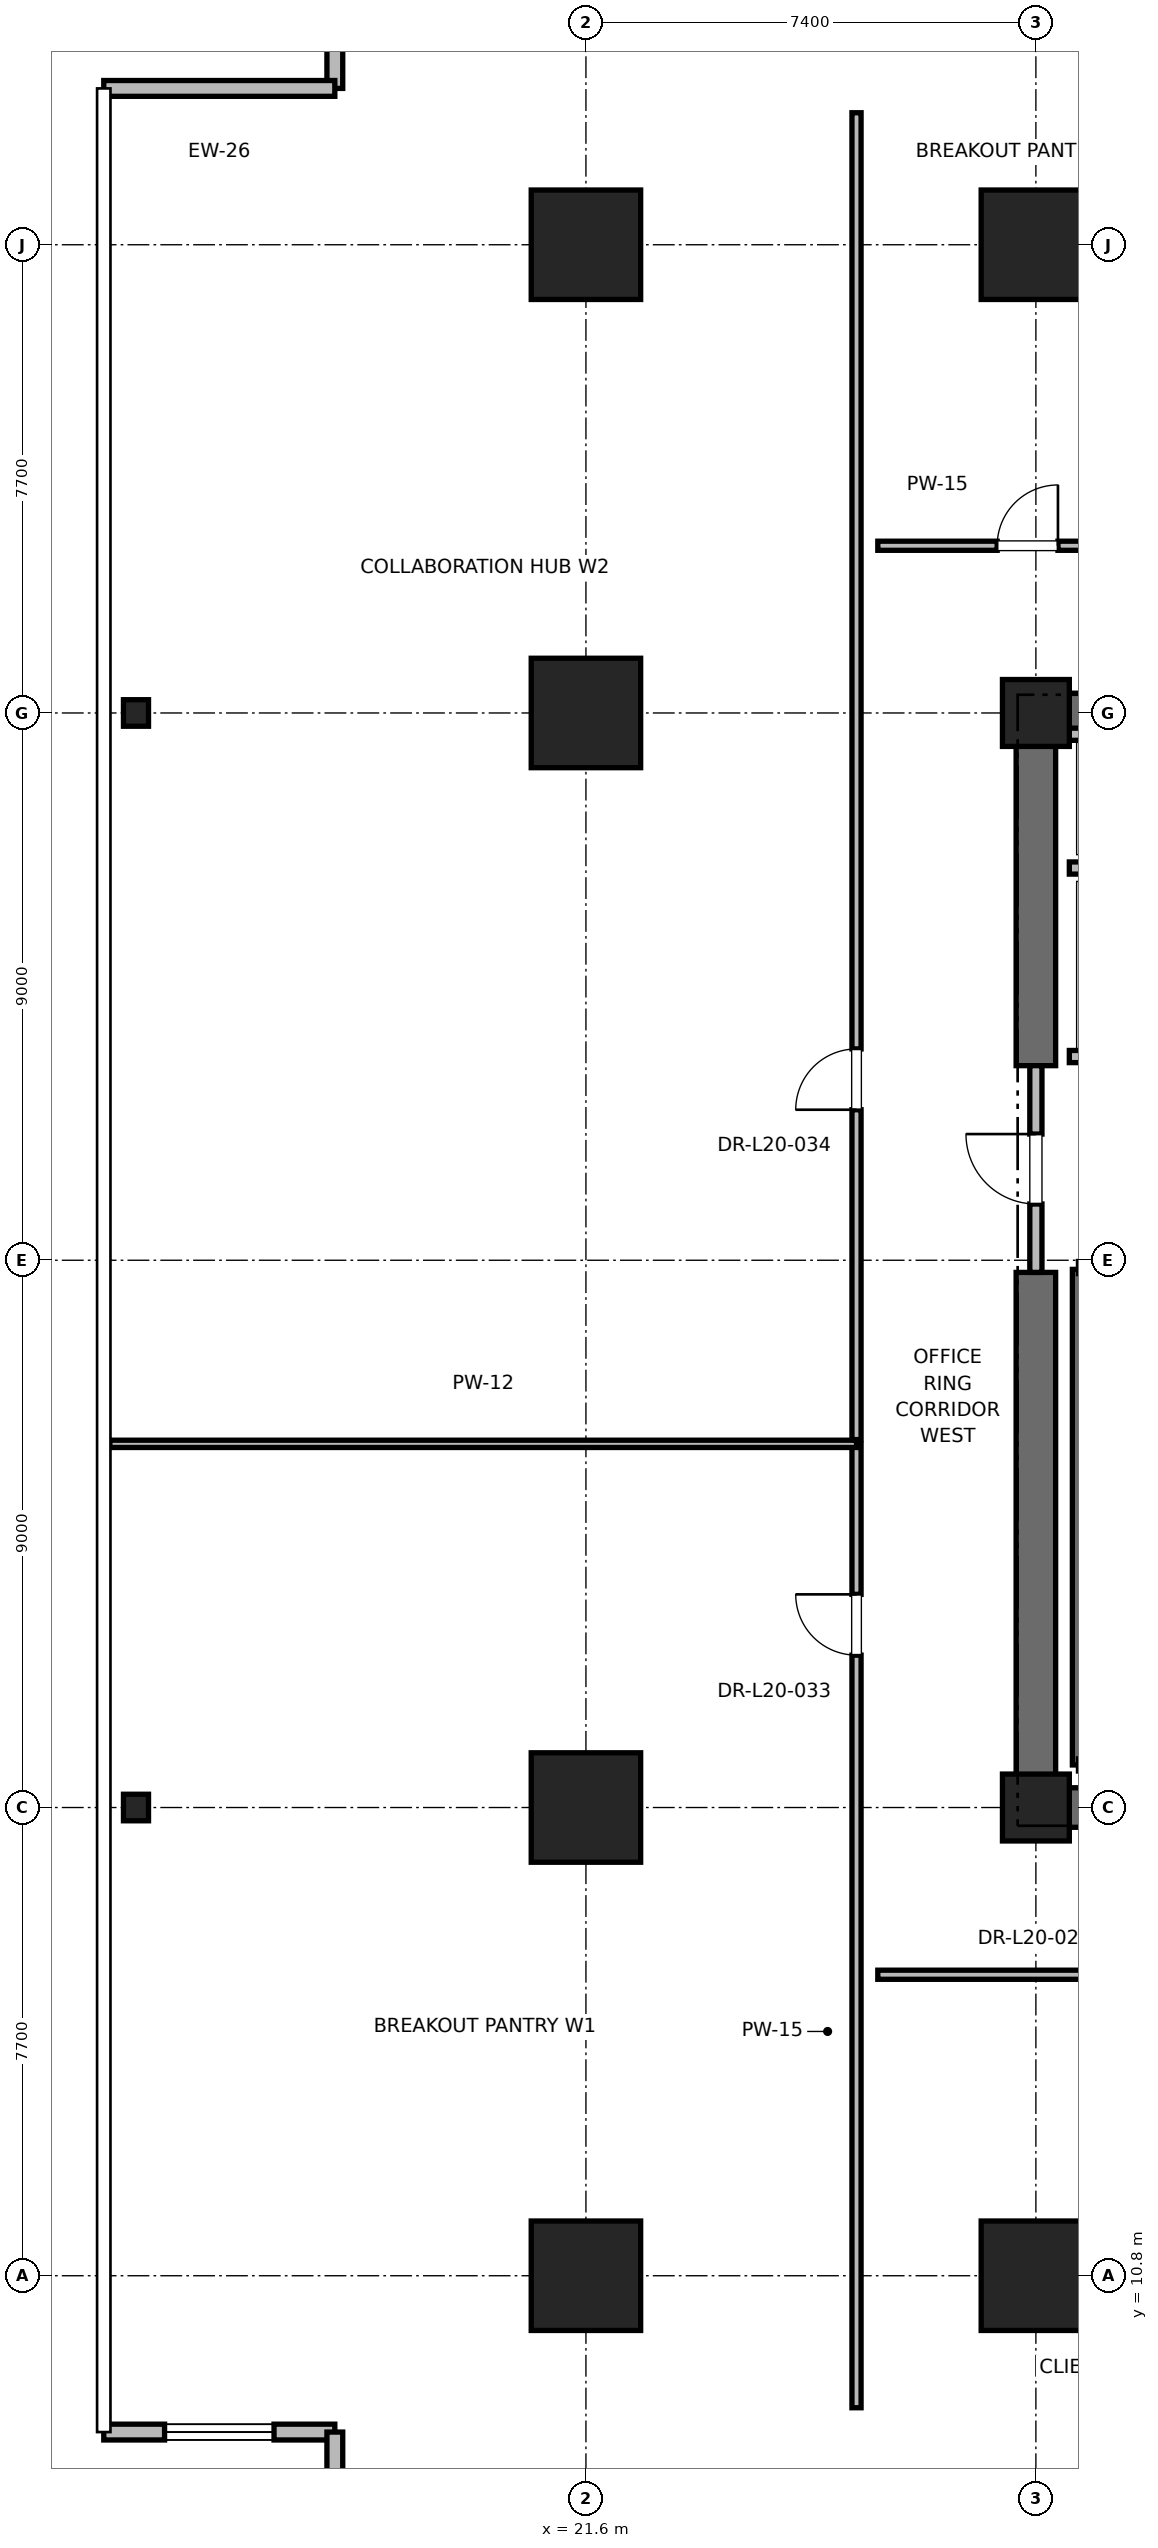
"""IFC4 building model, lengths in metres.
Left out: names, types, materials, properties, quantities, classifications, styles, units other than length and angle.
Written with IfcOpenShell. Run it as: python <this file> out.ifc"""

import sys

from ifc_helpers import new_model, si_unit, direction, frame, frame_2d, origin, origin_2d, place, context, subcontext, project, spatial, rectangle, i_section, extrude, element, fill, save


model = new_model("IFC4")
c1 = context("Model", 3, precision=1e-05, world=origin(), true_north=direction((0.0, 1.0)))
c2 = subcontext(c1, "Body", "Model", "MODEL_VIEW")
j1 = project(units=[si_unit("LENGTHUNIT", "METRE"), si_unit("PLANEANGLEUNIT", "RADIAN")], contexts=[c1])
p1 = place(None, origin())
s1 = spatial("IfcSite", under=j1, at=p1, CompositionType="ELEMENT")
p2 = place(p1, origin())
s2 = spatial("IfcBuilding", under=s1, at=p2, CompositionType="ELEMENT")
p3 = place(p2, frame((0.0, 0.0, 87.6)))
s3 = spatial("IfcBuildingStorey", under=s2, at=p3, CompositionType="ELEMENT", Elevation=87.6)
for number, where, z_axis, x_axis in (
    (1, (29.0, 10.8, 0.0), (0.0, 0.0, 1.0), (1.0, 0.0, 0.0)),
    (2, (29.0, 44.2, 0.0), (0.0, 0.0, 1.0), (1.0, 0.0, 0.0)),
    (3, (21.6, 18.5, 0.0), (0.0, 0.0, 1.0), (1.0, 0.0, 0.0)),
    (4, (21.6, 36.5, 0.0), (0.0, 0.0, 1.0), (1.0, 0.0, 0.0)),
    (5, (21.6, 10.8, 0.0), (0.0, 0.0, 1.0), (1.0, 0.0, 0.0)),
    (6, (21.6, 44.2, 0.0), (0.0, 0.0, 1.0), (1.0, 0.0, 0.0)),
):
    element("IfcColumn", number, at=place(p3, frame(where, z_axis=z_axis, x_axis=x_axis)), inside=s3, PredefinedType="COLUMN", context=c2, shape_type="SweptSolid", body=[
        extrude(rectangle(XDim=1.8, YDim=1.8, at=origin_2d()), origin(), (0.0, 0.0, 1.0), 4.0),
    ])
for number, where, z_axis, x_axis in (
    (7, (14.2, 18.5, 0.0), (0.0, 0.0, 1.0), (1.0, 0.0, 0.0)),
    (8, (14.2, 36.5, 0.0), (0.0, 0.0, 1.0), (1.0, 0.0, 0.0)),
):
    element("IfcColumn", number, at=place(p3, frame(where, z_axis=z_axis, x_axis=x_axis)), inside=s3, PredefinedType="COLUMN", context=c2, shape_type="SweptSolid", body=[
        extrude(i_section(OverallWidth=0.412, OverallDepth=0.437, WebThickness=0.036, FlangeThickness=0.058, FilletRadius=0.015, at=origin_2d()), origin(), (0.0, 0.0, 1.0), 4.0),
    ])
for number, where, z_axis, x_axis in (
    (9, (29.0, 18.5, 0.0), (0.0, 0.0, 1.0), (1.0, 0.0, 0.0)),
    (10, (29.0, 36.5, 0.0), (0.0, 0.0, 1.0), (1.0, 0.0, 0.0)),
):
    element("IfcColumn", number, at=place(p3, frame(where, z_axis=z_axis, x_axis=x_axis)), inside=s3, PredefinedType="PILASTER", context=c2, shape_type="SweptSolid", body=[
        extrude(rectangle(XDim=1.1, YDim=1.1, at=origin_2d()), origin(), (0.0, 0.0, 1.0), 4.0),
    ])
p4 = place(p3, frame((29.0, 18.5, 0.0), z_axis=(0.0, 0.0, 1.0), x_axis=(1.0, 0.0, 0.0)))
e11 = element("IfcWall", 11, at=p4, inside=s3, PredefinedType="SHEAR", context=c2, shape_type="SweptSolid", body=[
    extrude(rectangle(XDim=9.2, YDim=0.65, at=frame_2d((4.6, 0.0))), origin(), (0.0, 0.0, 1.0), 3.76),
])
p5 = place(p3, frame((29.0, 36.5, 0.0), z_axis=(0.0, 0.0, 1.0), x_axis=(1.0, 0.0, 0.0)))
e12 = element("IfcWall", 12, at=p5, inside=s3, PredefinedType="SHEAR", context=c2, shape_type="SweptSolid", body=[
    extrude(rectangle(XDim=5.8, YDim=0.65, at=frame_2d((2.9, 0.0))), origin(), (0.0, 0.0, 1.0), 3.76),
])
p6 = place(p3, frame((29.0, 18.5, 0.0), z_axis=(0.0, 0.0, 1.0), x_axis=(0.0, 1.0, 0.0)))
e13 = element("IfcWall", 13, at=p6, inside=s3, PredefinedType="SHEAR", context=c2, shape_type="SweptSolid", body=[
    extrude(rectangle(XDim=8.8, YDim=0.65, at=frame_2d((4.4, 0.0))), origin(), (0.0, 0.0, 1.0), 3.76),
])
p7 = place(p3, frame((29.0, 30.7, 0.0), z_axis=(0.0, 0.0, 1.0), x_axis=(0.0, 1.0, 0.0)))
e14 = element("IfcWall", 14, at=p7, inside=s3, PredefinedType="SHEAR", context=c2, shape_type="SweptSolid", body=[
    extrude(rectangle(XDim=5.8, YDim=0.65, at=frame_2d((2.9, 0.0))), origin(), (0.0, 0.0, 1.0), 3.76),
])
p8 = place(p3, frame((13.67, 8.229, 0.0), z_axis=(0.0, 0.0, 1.0), x_axis=(1.0, 0.0, 0.0)))
e15 = element("IfcWall", 15, at=p8, inside=s3, PredefinedType="PARAPET", context=c2, shape_type="SweptSolid", body=[
    extrude(rectangle(XDim=3.8, YDim=0.26, at=frame_2d((1.9, 0.0))), origin(), (0.0, 0.0, 1.0), 3.76),
])
p9 = place(p8, frame((1.0, 0.0, 0.85)))
e16 = element("IfcOpeningElement", 16, at=p9, cuts=e15, PredefinedType="OPENING", context=c2, shape_type="SweptSolid", body=[
    extrude(rectangle(XDim=1.8, YDim=2.2, at=frame_2d((0.9, 1.1))), frame((0.0, 0.13, 0.0), z_axis=(0.0, -1.0, 0.0), x_axis=(1.0, 0.0, 0.0)), (0.0, 0.0, 1.0), 0.26),
])
p10 = place(p3, frame((17.47, 8.229, 0.0), z_axis=(0.0, 0.0, 1.0), x_axis=(0.0, -1.0, 0.0)))
e17 = element("IfcWall", 17, at=p10, inside=s3, PredefinedType="PARAPET", context=c2, shape_type="SweptSolid", body=[
    extrude(rectangle(XDim=3.4, YDim=0.26, at=frame_2d((1.7, 0.0))), origin(), (0.0, 0.0, 1.0), 3.76),
])
p11 = place(p3, frame((17.47, 50.171, 0.0), z_axis=(0.0, 0.0, 1.0), x_axis=(0.0, -1.0, 0.0)))
e18 = element("IfcWall", 18, at=p11, inside=s3, PredefinedType="PARAPET", context=c2, shape_type="SweptSolid", body=[
    extrude(rectangle(XDim=3.4, YDim=0.26, at=frame_2d((1.7, 0.0))), origin(), (0.0, 0.0, 1.0), 3.76),
])
p12 = place(p11, frame((0.8, 0.0, 0.85)))
e19 = element("IfcOpeningElement", 19, at=p12, cuts=e18, PredefinedType="OPENING", context=c2, shape_type="SweptSolid", body=[
    extrude(rectangle(XDim=1.8, YDim=2.2, at=frame_2d((0.9, 1.1))), frame((0.0, 0.13, 0.0), z_axis=(0.0, -1.0, 0.0), x_axis=(1.0, 0.0, 0.0)), (0.0, 0.0, 1.0), 0.26),
])
p13 = place(p3, frame((17.47, 46.771, 0.0), z_axis=(0.0, 0.0, 1.0), x_axis=(-1.0, 0.0, 0.0)))
e20 = element("IfcWall", 20, at=p13, inside=s3, PredefinedType="PARAPET", context=c2, shape_type="SweptSolid", body=[
    extrude(rectangle(XDim=3.8, YDim=0.26, at=frame_2d((1.9, 0.0))), origin(), (0.0, 0.0, 1.0), 3.76),
])
p14 = place(p3, frame((29.7, 19.2, 0.0), z_axis=(0.0, 0.0, 1.0), x_axis=(0.0, 1.0, 0.0)))
e21 = element("IfcWall", 21, at=p14, inside=s3, PredefinedType="SOLIDWALL", context=c2, shape_type="SweptSolid", body=[
    extrude(rectangle(XDim=8.15, YDim=0.2, at=frame_2d((4.075, 0.0))), origin(), (0.0, 0.0, 1.0), 3.76),
])
p15 = place(p3, frame((29.0, 27.3, 0.0), z_axis=(0.0, 0.0, 1.0), x_axis=(0.0, 1.0, 0.0)))
e22 = element("IfcWall", 22, at=p15, inside=s3, PredefinedType="PARTITIONING", context=c2, shape_type="SweptSolid", body=[
    extrude(rectangle(XDim=3.4, YDim=0.2, at=frame_2d((1.7, 0.0))), origin(), (0.0, 0.0, 1.0), 2.54),
])
p16 = place(p15, frame((1.125, 0.0, 0.0)))
e23 = element("IfcOpeningElement", 23, at=p16, cuts=e22, PredefinedType="OPENING", context=c2, shape_type="SweptSolid", body=[
    extrude(rectangle(XDim=1.15, YDim=2.2, at=frame_2d((0.575, 1.1))), frame((0.0, 0.1, 0.0), z_axis=(0.0, -1.0, 0.0), x_axis=(1.0, 0.0, 0.0)), (0.0, 0.0, 1.0), 0.2),
])
p17 = place(p3, frame((29.55, 30.85, 0.0), z_axis=(0.0, 0.0, 1.0), x_axis=(1.0, 0.0, 0.0)))
e24 = element("IfcWall", 24, at=p17, inside=s3, PredefinedType="SOLIDWALL", context=c2, shape_type="SweptSolid", body=[
    extrude(rectangle(XDim=2.6, YDim=0.2, at=frame_2d((1.3, 0.0))), origin(), (0.0, 0.0, 1.0), 2.54),
])
p18 = place(p17, frame((0.75, 0.0, 0.0)))
e25 = element("IfcOpeningElement", 25, at=p18, cuts=e24, PredefinedType="OPENING", context=c2, shape_type="SweptSolid", body=[
    extrude(rectangle(XDim=1.1, YDim=2.2, at=frame_2d((0.55, 1.1))), frame((0.0, 0.1, 0.0), z_axis=(0.0, -1.0, 0.0), x_axis=(1.0, 0.0, 0.0)), (0.0, 0.0, 1.0), 0.2),
])
p19 = place(p3, frame((29.55, 33.95, 0.0), z_axis=(0.0, 0.0, 1.0), x_axis=(1.0, 0.0, 0.0)))
e26 = element("IfcWall", 26, at=p19, inside=s3, PredefinedType="SOLIDWALL", context=c2, shape_type="SweptSolid", body=[
    extrude(rectangle(XDim=2.8, YDim=0.2, at=frame_2d((1.4, 0.0))), origin(), (0.0, 0.0, 1.0), 3.76),
])
p20 = place(p3, frame((32.35, 36.15, 0.0), z_axis=(0.0, 0.0, 1.0), x_axis=(-1.0, 0.0, 0.0)))
e27 = element("IfcWall", 27, at=p20, inside=s3, PredefinedType="SOLIDWALL", context=c2, shape_type="SweptSolid", body=[
    extrude(rectangle(XDim=2.8, YDim=0.2, at=frame_2d((1.4, 0.0))), origin(), (0.0, 0.0, 1.0), 2.889),
])
p21 = place(p3, frame((26.4, 39.25, 0.0), z_axis=(0.0, 0.0, 1.0), x_axis=(1.0, 0.0, 0.0)))
e28 = element("IfcWall", 28, at=p21, inside=s3, PredefinedType="PARTITIONING", context=c2, shape_type="SweptSolid", body=[
    extrude(rectangle(XDim=4.896, YDim=0.15, at=frame_2d((2.448, 0.0))), origin(), (0.0, 0.0, 1.0), 2.85),
])
p22 = place(p21, frame((1.963, 0.0, 0.0)))
e29 = element("IfcOpeningElement", 29, at=p22, cuts=e28, PredefinedType="OPENING", context=c2, shape_type="SweptSolid", body=[
    extrude(rectangle(XDim=1.0, YDim=2.15, at=frame_2d((0.5, 1.075))), frame((0.0, 0.075, 0.0), z_axis=(0.0, -1.0, 0.0), x_axis=(1.0, 0.0, 0.0)), (0.0, 0.0, 1.0), 0.15),
])
p23 = place(p3, frame((26.4, 15.75, 0.0), z_axis=(0.0, 0.0, 1.0), x_axis=(1.0, 0.0, 0.0)))
e30 = element("IfcWall", 30, at=p23, inside=s3, PredefinedType="PARTITIONING", context=c2, shape_type="SweptSolid", body=[
    extrude(rectangle(XDim=9.248, YDim=0.15, at=frame_2d((4.624, 0.0))), origin(), (0.0, 0.0, 1.0), 2.85),
])
p24 = place(p23, frame((3.889, 0.0, 0.0)))
e31 = element("IfcOpeningElement", 31, at=p24, cuts=e30, PredefinedType="OPENING", context=c2, shape_type="SweptSolid", body=[
    extrude(rectangle(XDim=1.5, YDim=2.25, at=frame_2d((0.75, 1.125))), frame((0.0, 0.075, 0.0), z_axis=(0.0, -1.0, 0.0), x_axis=(1.0, 0.0, 0.0)), (0.0, 0.0, 1.0), 0.15),
])
p25 = place(p3, frame((26.05, 8.629, 0.0), z_axis=(0.0, 0.0, 1.0), x_axis=(0.0, 1.0, 0.0)))
e32 = element("IfcWall", 32, at=p25, inside=s3, PredefinedType="PARTITIONING", context=c2, shape_type="SweptSolid", body=[
    extrude(rectangle(XDim=15.852, YDim=0.15, at=frame_2d((7.926, 0.0))), origin(), (0.0, 0.0, 1.0), 2.85),
])
p26 = place(p25, frame((12.376, 0.0, 0.0)))
e33 = element("IfcOpeningElement", 33, at=p26, cuts=e32, PredefinedType="OPENING", context=c2, shape_type="SweptSolid", body=[
    extrude(rectangle(XDim=1.0, YDim=2.15, at=frame_2d((0.5, 1.075))), frame((0.0, 0.075, 0.0), z_axis=(0.0, -1.0, 0.0), x_axis=(1.0, 0.0, 0.0)), (0.0, 0.0, 1.0), 0.15),
])
p27 = place(p3, frame((13.77, 24.481, 0.0), z_axis=(0.0, 0.0, 1.0), x_axis=(1.0, 0.0, 0.0)))
e34 = element("IfcWall", 34, at=p27, inside=s3, PredefinedType="PARTITIONING", context=c2, shape_type="SweptSolid", body=[
    extrude(rectangle(XDim=12.28, YDim=0.12, at=frame_2d((6.14, 0.0))), origin(), (0.0, 0.0, 1.0), 2.85),
])
p28 = place(p3, frame((26.05, 24.551, 0.0), z_axis=(0.0, 0.0, 1.0), x_axis=(0.0, 1.0, 0.0)))
e35 = element("IfcWall", 35, at=p28, inside=s3, PredefinedType="PARTITIONING", context=c2, shape_type="SweptSolid", body=[
    extrude(rectangle(XDim=21.82, YDim=0.15, at=frame_2d((10.91, 0.0))), origin(), (0.0, 0.0, 1.0), 2.85),
])
p29 = place(p28, frame((5.425, 0.0, 0.0)))
e36 = element("IfcOpeningElement", 36, at=p29, cuts=e35, PredefinedType="OPENING", context=c2, shape_type="SweptSolid", body=[
    extrude(rectangle(XDim=1.0, YDim=2.15, at=frame_2d((0.5, 1.075))), frame((0.0, 0.075, 0.0), z_axis=(0.0, -1.0, 0.0), x_axis=(1.0, 0.0, 0.0)), (0.0, 0.0, 1.0), 0.15),
])
p30 = place(p9, origin())
e37 = element("IfcWindow", 37, at=p30, inside=s3, PartitioningType="SINGLE_PANEL", PredefinedType="WINDOW", context=c2, shape_type="SweptSolid", body=[
    extrude(rectangle(XDim=1.8, YDim=2.2, at=frame_2d((0.9, 1.1))), frame((0.0, 0.03, 0.0), z_axis=(0.0, -1.0, 0.0), x_axis=(1.0, 0.0, 0.0)), (0.0, 0.0, 1.0), 0.06),
])
fill(e16, e37)
p31 = place(p16, origin())
e38 = element("IfcDoor", 38, at=p31, inside=s3, OperationType="SINGLE_SWING_RIGHT", PredefinedType="DOOR", context=c2, shape_type="SweptSolid", body=[
    extrude(rectangle(XDim=1.15, YDim=2.2, at=frame_2d((0.575, 1.1))), frame((0.0, 0.025, 0.0), z_axis=(0.0, -1.0, 0.0), x_axis=(1.0, 0.0, 0.0)), (0.0, 0.0, 1.0), 0.05),
])
fill(e23, e38)
p32 = place(p22, origin())
e39 = element("IfcDoor", 39, at=p32, inside=s3, OperationType="SINGLE_SWING_RIGHT", PredefinedType="DOOR", context=c2, shape_type="SweptSolid", body=[
    extrude(rectangle(XDim=1.0, YDim=2.15, at=frame_2d((0.5, 1.075))), frame((0.0, 0.025, 0.0), z_axis=(0.0, -1.0, 0.0), x_axis=(1.0, 0.0, 0.0)), (0.0, 0.0, 1.0), 0.05),
])
fill(e29, e39)
p33 = place(p26, origin())
e40 = element("IfcDoor", 40, at=p33, inside=s3, OperationType="SINGLE_SWING_RIGHT", PredefinedType="DOOR", context=c2, shape_type="SweptSolid", body=[
    extrude(rectangle(XDim=1.0, YDim=2.15, at=frame_2d((0.5, 1.075))), frame((0.0, 0.025, 0.0), z_axis=(0.0, -1.0, 0.0), x_axis=(1.0, 0.0, 0.0)), (0.0, 0.0, 1.0), 0.05),
])
fill(e33, e40)
p34 = place(p29, origin())
e41 = element("IfcDoor", 41, at=p34, inside=s3, OperationType="SINGLE_SWING_LEFT", PredefinedType="DOOR", context=c2, shape_type="SweptSolid", body=[
    extrude(rectangle(XDim=1.0, YDim=2.15, at=frame_2d((0.5, 1.075))), frame((0.0, 0.025, 0.0), z_axis=(0.0, -1.0, 0.0), x_axis=(1.0, 0.0, 0.0)), (0.0, 0.0, 1.0), 0.05),
])
fill(e36, e41)
save(model, sys.argv[1])
